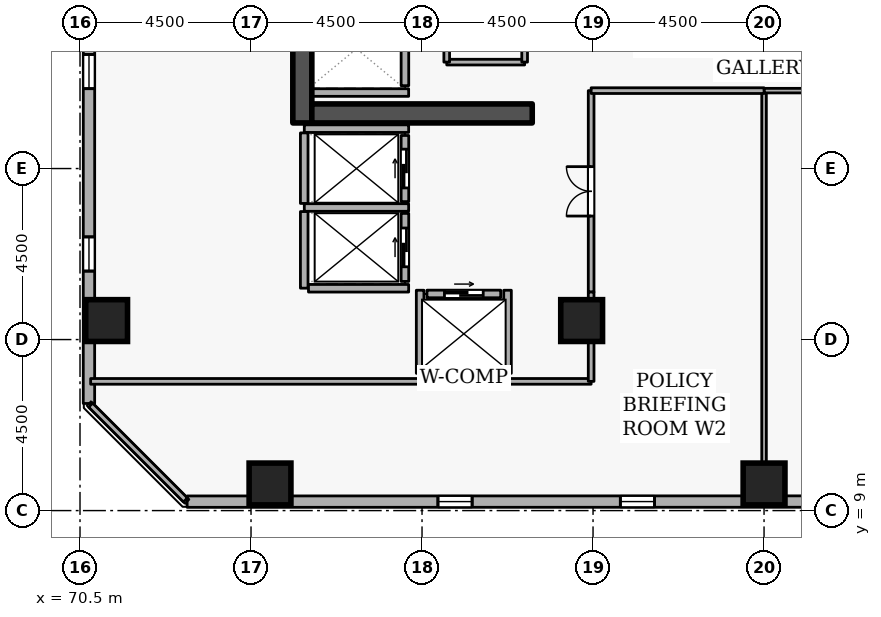
"""IFC4 building model, lengths in metres.
Left out: names, types, materials, properties, quantities, classifications, styles, units other than length and angle.
Written with IfcOpenShell. Run it as: python <this file> out.ifc"""

import sys

from ifc_helpers import new_model, si_unit, direction, frame, frame_2d, origin, origin_2d, place, context, subcontext, project, spatial, rectangle, extrude, element, fill, save


model = new_model("IFC4")
c1 = context("Model", 3, precision=1e-05, world=origin(), true_north=direction((0.0, 1.0)))
c2 = subcontext(c1, "Body", "Model", "MODEL_VIEW")
j1 = project(units=[si_unit("LENGTHUNIT", "METRE"), si_unit("PLANEANGLEUNIT", "RADIAN")], contexts=[c1])
p1 = place(None, origin())
s1 = spatial("IfcSite", under=j1, at=p1, CompositionType="ELEMENT")
p2 = place(p1, origin())
s2 = spatial("IfcBuilding", under=s1, at=p2, CompositionType="ELEMENT")
p3 = place(p2, frame((0.0, 0.0, 152.7)))
s3 = spatial("IfcBuildingStorey", under=s2, at=p3, CompositionType="ELEMENT", Elevation=152.7)
p4 = place(p3, frame((76.35, 19.2, 0.0), z_axis=(0.0, 0.0, 1.0), x_axis=(0.0, 1.0, 0.0)))
e1 = element("IfcWall", 1, at=p4, inside=s3, PredefinedType="SHEAR", context=c2, shape_type="SweptSolid", body=[
    extrude(rectangle(XDim=15.6, YDim=0.5, at=frame_2d((7.8, 0.0))), origin(), (0.0, 0.0, 1.0), 3.6),
])
p5 = place(p3, frame((76.6, 19.45, 0.0), z_axis=(0.0, 0.0, 1.0), x_axis=(1.0, 0.0, 0.0)))
e2 = element("IfcWall", 2, at=p5, inside=s3, PredefinedType="SHEAR", context=c2, shape_type="SweptSolid", body=[
    extrude(rectangle(XDim=5.8, YDim=0.5, at=frame_2d((2.9, 0.0))), origin(), (0.0, 0.0, 1.0), 3.6),
])
for number, where, z_axis, x_axis in (
    (3, (71.2, 14.0, 0.0), (0.0, 0.0, 1.0), (1.0, 0.0, 0.0)),
    (4, (88.5, 9.7, 0.0), (0.0, 0.0, 1.0), (1.0, 0.0, 0.0)),
    (5, (75.5, 9.7, 0.0), (0.0, 0.0, 1.0), (1.0, 0.0, 0.0)),
    (6, (83.7, 14.0, 0.0), (0.0, 0.0, 1.0), (1.0, 0.0, 0.0)),
):
    element("IfcColumn", number, at=place(p3, frame(where, z_axis=z_axis, x_axis=x_axis)), inside=s3, PredefinedType="COLUMN", context=c2, shape_type="SweptSolid", body=[
        extrude(rectangle(XDim=1.1, YDim=1.1, at=origin_2d()), origin(), (0.0, 0.0, 1.0), 3.6),
    ])
p6 = place(p3, frame((73.319, 9.235, 0.0), z_axis=(0.0, 0.0, 1.0), x_axis=(0.999999991209, 0.000132597301, 0.0)))
e7 = element("IfcWall", 7, at=p6, inside=s3, PredefinedType="STANDARD", context=c2, shape_type="SweptSolid", body=[
    extrude(rectangle(XDim=34.983, YDim=0.3, at=frame_2d((17.492, 0.0))), origin(), (0.0, 0.0, 1.0), 2.7),
])
p7 = place(p6, frame((6.6, 0.0, 0.72)))
e8 = element("IfcOpeningElement", 8, at=p7, cuts=e7, PredefinedType="OPENING", context=c2, shape_type="SweptSolid", body=[
    extrude(rectangle(XDim=0.9, YDim=1.75, at=frame_2d((0.45, 0.875))), frame((0.0, 0.16, 0.0), z_axis=(0.0, -1.0, 0.0), x_axis=(1.0, 0.0, 0.0)), (0.0, 0.0, 1.0), 0.32),
])
p8 = place(p6, frame((11.4, 0.0, 0.72)))
e9 = element("IfcOpeningElement", 9, at=p8, cuts=e7, PredefinedType="OPENING", context=c2, shape_type="SweptSolid", body=[
    extrude(rectangle(XDim=0.9, YDim=1.75, at=frame_2d((0.45, 0.875))), frame((0.0, 0.16, 0.0), z_axis=(0.0, -1.0, 0.0), x_axis=(1.0, 0.0, 0.0)), (0.0, 0.0, 1.0), 0.32),
])
p9 = place(p6, frame((21.0, 0.0, 0.72)))
e10 = element("IfcOpeningElement", 10, at=p9, cuts=e7, PredefinedType="OPENING", context=c2, shape_type="SweptSolid", body=[
    extrude(rectangle(XDim=0.9, YDim=1.75, at=frame_2d((0.45, 0.875))), frame((0.0, 0.16, 0.0), z_axis=(0.0, -1.0, 0.0), x_axis=(1.0, 0.0, 0.0)), (0.0, 0.0, 1.0), 0.32),
])
p10 = place(p6, frame((25.8, 0.0, 0.72)))
e11 = element("IfcOpeningElement", 11, at=p10, cuts=e7, PredefinedType="OPENING", context=c2, shape_type="SweptSolid", body=[
    extrude(rectangle(XDim=0.9, YDim=1.75, at=frame_2d((0.45, 0.875))), frame((0.0, 0.16, 0.0), z_axis=(0.0, -1.0, 0.0), x_axis=(1.0, 0.0, 0.0)), (0.0, 0.0, 1.0), 0.32),
])
p11 = place(p6, frame((30.6, 0.0, 0.72)))
e12 = element("IfcOpeningElement", 12, at=p11, cuts=e7, PredefinedType="OPENING", context=c2, shape_type="SweptSolid", body=[
    extrude(rectangle(XDim=0.9, YDim=1.75, at=frame_2d((0.45, 0.875))), frame((0.0, 0.16, 0.0), z_axis=(0.0, -1.0, 0.0), x_axis=(1.0, 0.0, 0.0)), (0.0, 0.0, 1.0), 0.32),
])
p12 = place(p3, frame((70.74, 46.802, 0.0), z_axis=(0.0, 0.0, 1.0), x_axis=(-0.000132597301, -0.999999991209, 0.0)))
e13 = element("IfcWall", 13, at=p12, inside=s3, PredefinedType="STANDARD", context=c2, shape_type="SweptSolid", body=[
    extrude(rectangle(XDim=34.983, YDim=0.3, at=frame_2d((17.492, 0.0))), origin(), (0.0, 0.0, 1.0), 2.7),
])
p13 = place(p12, frame((1.8, 0.0, 0.72)))
e14 = element("IfcOpeningElement", 14, at=p13, cuts=e13, PredefinedType="OPENING", context=c2, shape_type="SweptSolid", body=[
    extrude(rectangle(XDim=0.9, YDim=1.75, at=frame_2d((0.45, 0.875))), frame((0.0, 0.16, 0.0), z_axis=(0.0, -1.0, 0.0), x_axis=(1.0, 0.0, 0.0)), (0.0, 0.0, 1.0), 0.32),
])
p14 = place(p12, frame((11.4, 0.0, 0.72)))
e15 = element("IfcOpeningElement", 15, at=p14, cuts=e13, PredefinedType="OPENING", context=c2, shape_type="SweptSolid", body=[
    extrude(rectangle(XDim=0.9, YDim=1.75, at=frame_2d((0.45, 0.875))), frame((0.0, 0.16, 0.0), z_axis=(0.0, -1.0, 0.0), x_axis=(1.0, 0.0, 0.0)), (0.0, 0.0, 1.0), 0.32),
])
p15 = place(p12, frame((16.2, 0.0, 0.72)))
e16 = element("IfcOpeningElement", 16, at=p15, cuts=e13, PredefinedType="OPENING", context=c2, shape_type="SweptSolid", body=[
    extrude(rectangle(XDim=0.9, YDim=1.75, at=frame_2d((0.45, 0.875))), frame((0.0, 0.16, 0.0), z_axis=(0.0, -1.0, 0.0), x_axis=(1.0, 0.0, 0.0)), (0.0, 0.0, 1.0), 0.32),
])
p16 = place(p12, frame((21.0, 0.0, 0.72)))
e17 = element("IfcOpeningElement", 17, at=p16, cuts=e13, PredefinedType="OPENING", context=c2, shape_type="SweptSolid", body=[
    extrude(rectangle(XDim=0.9, YDim=1.75, at=frame_2d((0.45, 0.875))), frame((0.0, 0.16, 0.0), z_axis=(0.0, -1.0, 0.0), x_axis=(1.0, 0.0, 0.0)), (0.0, 0.0, 1.0), 0.32),
])
p17 = place(p12, frame((25.8, 0.0, 0.72)))
e18 = element("IfcOpeningElement", 18, at=p17, cuts=e13, PredefinedType="OPENING", context=c2, shape_type="SweptSolid", body=[
    extrude(rectangle(XDim=0.9, YDim=1.75, at=frame_2d((0.45, 0.875))), frame((0.0, 0.16, 0.0), z_axis=(0.0, -1.0, 0.0), x_axis=(1.0, 0.0, 0.0)), (0.0, 0.0, 1.0), 0.32),
])
p18 = place(p12, frame((30.6, 0.0, 0.72)))
e19 = element("IfcOpeningElement", 19, at=p18, cuts=e13, PredefinedType="OPENING", context=c2, shape_type="SweptSolid", body=[
    extrude(rectangle(XDim=0.9, YDim=1.75, at=frame_2d((0.45, 0.875))), frame((0.0, 0.16, 0.0), z_axis=(0.0, -1.0, 0.0), x_axis=(1.0, 0.0, 0.0)), (0.0, 0.0, 1.0), 0.32),
])
p19 = place(p3, frame((79.05, 20.18, 0.0), z_axis=(0.0, 0.0, 1.0), x_axis=(0.0, 1.0, 0.0)))
e20 = element("IfcWall", 20, at=p19, inside=s3, PredefinedType="STANDARD", context=c2, shape_type="SweptSolid", body=[
    extrude(rectangle(XDim=1.94, YDim=0.2, at=frame_2d((0.97, 0.0))), origin(), (0.0, 0.0, 1.0), 3.34),
])
p20 = place(p3, frame((79.05, 17.13, 0.0), z_axis=(0.0, 0.0, 1.0), x_axis=(0.0, 1.0, 0.0)))
e21 = element("IfcWall", 21, at=p20, inside=s3, PredefinedType="STANDARD", context=c2, shape_type="SweptSolid", body=[
    extrude(rectangle(XDim=1.74, YDim=0.2, at=frame_2d((0.87, 0.0))), origin(), (0.0, 0.0, 1.0), 3.34),
])
p21 = place(p20, frame((0.36, 0.0, 0.0)))
e22 = element("IfcOpeningElement", 22, at=p21, cuts=e21, PredefinedType="OPENING", context=c2, shape_type="SweptSolid", body=[
    extrude(rectangle(XDim=1.02, YDim=2.06, at=frame_2d((0.51, 1.03))), frame((0.0, 0.11, 0.0), z_axis=(0.0, -1.0, 0.0), x_axis=(1.0, 0.0, 0.0)), (0.0, 0.0, 1.0), 0.22),
])
p22 = place(p3, frame((79.05, 15.03, 0.0), z_axis=(0.0, 0.0, 1.0), x_axis=(0.0, 1.0, 0.0)))
e23 = element("IfcWall", 23, at=p22, inside=s3, PredefinedType="STANDARD", context=c2, shape_type="SweptSolid", body=[
    extrude(rectangle(XDim=1.79, YDim=0.2, at=frame_2d((0.895, 0.0))), origin(), (0.0, 0.0, 1.0), 3.34),
])
p23 = place(p22, frame((0.385, 0.0, 0.0)))
e24 = element("IfcOpeningElement", 24, at=p23, cuts=e23, PredefinedType="OPENING", context=c2, shape_type="SweptSolid", body=[
    extrude(rectangle(XDim=1.02, YDim=2.06, at=frame_2d((0.51, 1.03))), frame((0.0, 0.11, 0.0), z_axis=(0.0, -1.0, 0.0), x_axis=(1.0, 0.0, 0.0)), (0.0, 0.0, 1.0), 0.22),
])
p24 = place(p3, frame((79.63, 14.7, 0.0), z_axis=(0.0, 0.0, 1.0), x_axis=(1.0, 0.0, 0.0)))
e25 = element("IfcWall", 25, at=p24, inside=s3, PredefinedType="STANDARD", context=c2, shape_type="SweptSolid", body=[
    extrude(rectangle(XDim=1.94, YDim=0.2, at=frame_2d((0.97, 0.0))), origin(), (0.0, 0.0, 1.0), 3.34),
])
p25 = place(p24, frame((0.46, 0.0, 0.0)))
e26 = element("IfcOpeningElement", 26, at=p25, cuts=e25, PredefinedType="OPENING", context=c2, shape_type="SweptSolid", body=[
    extrude(rectangle(XDim=1.02, YDim=2.06, at=frame_2d((0.51, 1.03))), frame((0.0, 0.11, 0.0), z_axis=(0.0, -1.0, 0.0), x_axis=(1.0, 0.0, 0.0)), (0.0, 0.0, 1.0), 0.22),
])
p26 = place(p3, frame((76.612, 20.0, 0.0), z_axis=(0.0, 0.0, 1.0), x_axis=(1.0, 0.0, 0.0)))
e27 = element("IfcWall", 27, at=p26, inside=s3, PredefinedType="STANDARD", context=c2, shape_type="SweptSolid", body=[
    extrude(rectangle(XDim=2.536, YDim=0.2, at=frame_2d((1.268, 0.0))), origin(), (0.0, 0.0, 1.0), 3.34),
])
p27 = place(p3, frame((76.402, 19.05, 0.0), z_axis=(0.0, 0.0, 1.0), x_axis=(1.0, 0.0, 0.0)))
e28 = element("IfcWall", 28, at=p27, inside=s3, PredefinedType="STANDARD", context=c2, shape_type="SweptSolid", body=[
    extrude(rectangle(XDim=2.746, YDim=0.2, at=frame_2d((1.373, 0.0))), origin(), (0.0, 0.0, 1.0), 2.545),
])
p28 = place(p3, frame((76.402, 16.975, 0.0), z_axis=(0.0, 0.0, 1.0), x_axis=(1.0, 0.0, 0.0)))
e29 = element("IfcWall", 29, at=p28, inside=s3, PredefinedType="STANDARD", context=c2, shape_type="SweptSolid", body=[
    extrude(rectangle(XDim=2.746, YDim=0.2, at=frame_2d((1.373, 0.0))), origin(), (0.0, 0.0, 1.0), 3.34),
])
p29 = place(p3, frame((76.4, 14.852, 0.0), z_axis=(0.0, 0.0, 1.0), x_axis=(0.0, 1.0, 0.0)))
e30 = element("IfcWall", 30, at=p29, inside=s3, PredefinedType="STANDARD", context=c2, shape_type="SweptSolid", body=[
    extrude(rectangle(XDim=2.016, YDim=0.2, at=frame_2d((1.008, 0.0))), origin(), (0.0, 0.0, 1.0), 3.34),
])
p30 = place(p3, frame((76.4, 17.082, 0.0), z_axis=(0.0, 0.0, 1.0), x_axis=(0.0, 1.0, 0.0)))
e31 = element("IfcWall", 31, at=p30, inside=s3, PredefinedType="STANDARD", context=c2, shape_type="SweptSolid", body=[
    extrude(rectangle(XDim=1.856, YDim=0.2, at=frame_2d((0.928, 0.0))), origin(), (0.0, 0.0, 1.0), 3.34),
])
p31 = place(p3, frame((76.512, 14.85, 0.0), z_axis=(0.0, 0.0, 1.0), x_axis=(1.0, 0.0, 0.0)))
e32 = element("IfcWall", 32, at=p31, inside=s3, PredefinedType="STANDARD", context=c2, shape_type="SweptSolid", body=[
    extrude(rectangle(XDim=2.636, YDim=0.2, at=frame_2d((1.318, 0.0))), origin(), (0.0, 0.0, 1.0), 3.34),
])
p32 = place(p3, frame((79.452, 12.5, 0.0), z_axis=(0.0, 0.0, 1.0), x_axis=(1.0, 0.0, 0.0)))
e33 = element("IfcWall", 33, at=p32, inside=s3, PredefinedType="STANDARD", context=c2, shape_type="SweptSolid", body=[
    extrude(rectangle(XDim=2.296, YDim=0.2, at=frame_2d((1.148, 0.0))), origin(), (0.0, 0.0, 1.0), 3.34),
])
for number, where, z_axis, x_axis in (
    (34, (81.75, 12.612, 0.0), (0.0, 0.0, 1.0), (0.0, 1.0, 0.0)),
    (35, (79.45, 12.612, 0.0), (0.0, 0.0, 1.0), (0.0, 1.0, 0.0)),
):
    element("IfcWall", number, at=place(p3, frame(where, z_axis=z_axis, x_axis=x_axis)), inside=s3, PredefinedType="STANDARD", context=c2, shape_type="SweptSolid", body=[
        extrude(rectangle(XDim=2.186, YDim=0.2, at=frame_2d((1.093, 0.0))), origin(), (0.0, 0.0, 1.0), 3.34),
    ])
p33 = place(p3, frame((82.2, 20.8, 0.0), z_axis=(0.0, 0.0, 1.0), x_axis=(-1.0, 0.0, 0.0)))
e36 = element("IfcWall", 36, at=p33, inside=s3, PredefinedType="PARTITIONING", context=c2, shape_type="SweptSolid", body=[
    extrude(rectangle(XDim=2.05, YDim=0.15, at=frame_2d((1.025, 0.0))), origin(), (0.0, 0.0, 1.0), 3.34),
])
p34 = place(p3, frame((80.15, 20.8, 0.0), z_axis=(0.0, 0.0, 1.0), x_axis=(0.0, 1.0, 0.0)))
e37 = element("IfcWall", 37, at=p34, inside=s3, PredefinedType="PARTITIONING", context=c2, shape_type="SweptSolid", body=[
    extrude(rectangle(XDim=3.25, YDim=0.15, at=frame_2d((1.625, 0.0))), origin(), (0.0, 0.0, 1.0), 3.34),
])
p35 = place(p3, frame((82.2, 24.05, 0.0), z_axis=(0.0, 0.0, 1.0), x_axis=(0.0, -1.0, 0.0)))
e38 = element("IfcWall", 38, at=p35, inside=s3, PredefinedType="PARTITIONING", context=c2, shape_type="SweptSolid", body=[
    extrude(rectangle(XDim=3.25, YDim=0.15, at=frame_2d((1.625, 0.0))), origin(), (0.0, 0.0, 1.0), 3.34),
])
p36 = place(p35, frame((1.165, 0.0, 0.0)))
e39 = element("IfcOpeningElement", 39, at=p36, cuts=e38, PredefinedType="OPENING", context=c2, shape_type="SweptSolid", body=[
    extrude(rectangle(XDim=0.92, YDim=2.08, at=frame_2d((0.46, 1.04))), frame((0.0, 0.085, 0.0), z_axis=(0.0, -1.0, 0.0), x_axis=(1.0, 0.0, 0.0)), (0.0, 0.0, 1.0), 0.17),
])
p37 = place(p3, frame((88.5, 9.28, 0.0), z_axis=(0.0, 0.0, 1.0), x_axis=(0.0, 1.0, 0.0)))
e40 = element("IfcWall", 40, at=p37, inside=s3, PredefinedType="PARTITIONING", context=c2, shape_type="SweptSolid", body=[
    extrude(rectangle(XDim=10.77, YDim=0.12, at=frame_2d((5.385, 0.0))), origin(), (0.0, 0.0, 1.0), 2.932),
])
p38 = place(p3, frame((88.5, 20.05, 0.0), z_axis=(0.0, 0.0, 1.0), x_axis=(1.0, 0.0, 0.0)))
e41 = element("IfcWall", 41, at=p38, inside=s3, PredefinedType="PARTITIONING", context=c2, shape_type="SweptSolid", body=[
    extrude(rectangle(XDim=4.55, YDim=0.12, at=frame_2d((2.275, 0.0))), origin(), (0.0, 0.0, 1.0), 3.34),
])
p39 = place(p3, frame((83.95, 14.75, 0.0), z_axis=(0.0, 0.0, 1.0), x_axis=(0.0, 1.0, 0.0)))
e42 = element("IfcWall", 42, at=p39, inside=s3, PredefinedType="PARTITIONING", context=c2, shape_type="SweptSolid", body=[
    extrude(rectangle(XDim=5.3, YDim=0.15, at=frame_2d((2.65, 0.0))), origin(), (0.0, 0.0, 1.0), 3.34),
])
p40 = place(p39, frame((2.0, 0.0, 0.0)))
e43 = element("IfcOpeningElement", 43, at=p40, cuts=e42, PredefinedType="OPENING", context=c2, shape_type="SweptSolid", body=[
    extrude(rectangle(XDim=1.3, YDim=2.12, at=frame_2d((0.65, 1.06))), frame((0.0, 0.085, 0.0), z_axis=(0.0, -1.0, 0.0), x_axis=(1.0, 0.0, 0.0)), (0.0, 0.0, 1.0), 0.17),
])
p41 = place(p3, frame((83.95, 20.05, 0.0), z_axis=(0.0, 0.0, 1.0), x_axis=(1.0, 0.0, 0.0)))
e44 = element("IfcWall", 44, at=p41, inside=s3, PredefinedType="PARTITIONING", context=c2, shape_type="SweptSolid", body=[
    extrude(rectangle(XDim=4.55, YDim=0.15, at=frame_2d((2.275, 0.0))), origin(), (0.0, 0.0, 1.0), 3.34),
])
p42 = place(p3, frame((73.275, 9.28, 0.0), z_axis=(0.0, 0.0, 1.0), x_axis=(-0.707106781187, 0.707106781187, 0.0)))
e45 = element("IfcWall", 45, at=p42, inside=s3, PredefinedType="PARTITIONING", context=c2, shape_type="SweptSolid", body=[
    extrude(rectangle(XDim=3.528, YDim=0.15, at=frame_2d((1.764, 0.0))), origin(), (0.0, 0.0, 1.0), 3.34),
])
p43 = place(p3, frame((70.78, 12.4, 0.0), z_axis=(0.0, 0.0, 1.0), x_axis=(1.0, 0.0, 0.0)))
e46 = element("IfcWall", 46, at=p43, inside=s3, PredefinedType="PARTITIONING", context=c2, shape_type="SweptSolid", body=[
    extrude(rectangle(XDim=8.672, YDim=0.15, at=frame_2d((4.336, 0.0))), origin(), (0.0, 0.0, 1.0), 3.34),
])
p44 = place(p3, frame((81.748, 12.4, 0.0), z_axis=(0.0, 0.0, 1.0), x_axis=(1.0, 0.0, 0.0)))
e47 = element("IfcWall", 47, at=p44, inside=s3, PredefinedType="PARTITIONING", context=c2, shape_type="SweptSolid", body=[
    extrude(rectangle(XDim=2.202, YDim=0.15, at=frame_2d((1.101, 0.0))), origin(), (0.0, 0.0, 1.0), 3.34),
])
p45 = place(p3, frame((83.95, 12.4, 0.0), z_axis=(0.0, 0.0, 1.0), x_axis=(0.0, 1.0, 0.0)))
e48 = element("IfcWall", 48, at=p45, inside=s3, PredefinedType="PARTITIONING", context=c2, shape_type="SweptSolid", body=[
    extrude(rectangle(XDim=2.35, YDim=0.15, at=frame_2d((1.175, 0.0))), origin(), (0.0, 0.0, 1.0), 3.34),
])
p46 = place(p7, origin())
e49 = element("IfcWindow", 49, at=p46, inside=s3, PartitioningType="SINGLE_PANEL", PredefinedType="WINDOW", context=c2, shape_type="SweptSolid", body=[
    extrude(rectangle(XDim=0.9, YDim=1.75, at=frame_2d((0.45, 0.875))), frame((0.0, 0.03, 0.0), z_axis=(0.0, -1.0, 0.0), x_axis=(1.0, 0.0, 0.0)), (0.0, 0.0, 1.0), 0.06),
])
fill(e8, e49)
p47 = place(p8, origin())
e50 = element("IfcWindow", 50, at=p47, inside=s3, PartitioningType="SINGLE_PANEL", PredefinedType="WINDOW", context=c2, shape_type="SweptSolid", body=[
    extrude(rectangle(XDim=0.9, YDim=1.75, at=frame_2d((0.45, 0.875))), frame((0.0, 0.03, 0.0), z_axis=(0.0, -1.0, 0.0), x_axis=(1.0, 0.0, 0.0)), (0.0, 0.0, 1.0), 0.06),
])
fill(e9, e50)
p48 = place(p17, origin())
e51 = element("IfcWindow", 51, at=p48, inside=s3, PartitioningType="SINGLE_PANEL", PredefinedType="WINDOW", context=c2, shape_type="SweptSolid", body=[
    extrude(rectangle(XDim=0.9, YDim=1.75, at=frame_2d((0.45, 0.875))), frame((0.0, 0.03, 0.0), z_axis=(0.0, -1.0, 0.0), x_axis=(1.0, 0.0, 0.0)), (0.0, 0.0, 1.0), 0.06),
])
fill(e18, e51)
p49 = place(p18, origin())
e52 = element("IfcWindow", 52, at=p49, inside=s3, PartitioningType="SINGLE_PANEL", PredefinedType="WINDOW", context=c2, shape_type="SweptSolid", body=[
    extrude(rectangle(XDim=0.9, YDim=1.75, at=frame_2d((0.45, 0.875))), frame((0.0, 0.03, 0.0), z_axis=(0.0, -1.0, 0.0), x_axis=(1.0, 0.0, 0.0)), (0.0, 0.0, 1.0), 0.06),
])
fill(e19, e52)
p50 = place(p21, origin())
e53 = element("IfcDoor", 53, at=p50, inside=s3, OperationType="SLIDING_TO_LEFT", PredefinedType="DOOR", context=c2, shape_type="SweptSolid", body=[
    extrude(rectangle(XDim=1.02, YDim=2.06, at=frame_2d((0.51, 1.03))), frame((0.0, 0.025, 0.0), z_axis=(0.0, -1.0, 0.0), x_axis=(1.0, 0.0, 0.0)), (0.0, 0.0, 1.0), 0.05),
])
fill(e22, e53)
p51 = place(p23, origin())
e54 = element("IfcDoor", 54, at=p51, inside=s3, OperationType="SLIDING_TO_LEFT", PredefinedType="DOOR", context=c2, shape_type="SweptSolid", body=[
    extrude(rectangle(XDim=1.02, YDim=2.06, at=frame_2d((0.51, 1.03))), frame((0.0, 0.025, 0.0), z_axis=(0.0, -1.0, 0.0), x_axis=(1.0, 0.0, 0.0)), (0.0, 0.0, 1.0), 0.05),
])
fill(e24, e54)
p52 = place(p25, origin())
e55 = element("IfcDoor", 55, at=p52, inside=s3, OperationType="SLIDING_TO_LEFT", PredefinedType="DOOR", context=c2, shape_type="SweptSolid", body=[
    extrude(rectangle(XDim=1.02, YDim=2.06, at=frame_2d((0.51, 1.03))), frame((0.0, 0.025, 0.0), z_axis=(0.0, -1.0, 0.0), x_axis=(1.0, 0.0, 0.0)), (0.0, 0.0, 1.0), 0.05),
])
fill(e26, e55)
p53 = place(p40, origin())
e56 = element("IfcDoor", 56, at=p53, inside=s3, OperationType="DOUBLE_DOOR_SINGLE_SWING", PredefinedType="DOOR", context=c2, shape_type="SweptSolid", body=[
    extrude(rectangle(XDim=1.3, YDim=2.12, at=frame_2d((0.65, 1.06))), frame((0.0, 0.025, 0.0), z_axis=(0.0, -1.0, 0.0), x_axis=(1.0, 0.0, 0.0)), (0.0, 0.0, 1.0), 0.05),
])
fill(e43, e56)
save(model, sys.argv[1])
